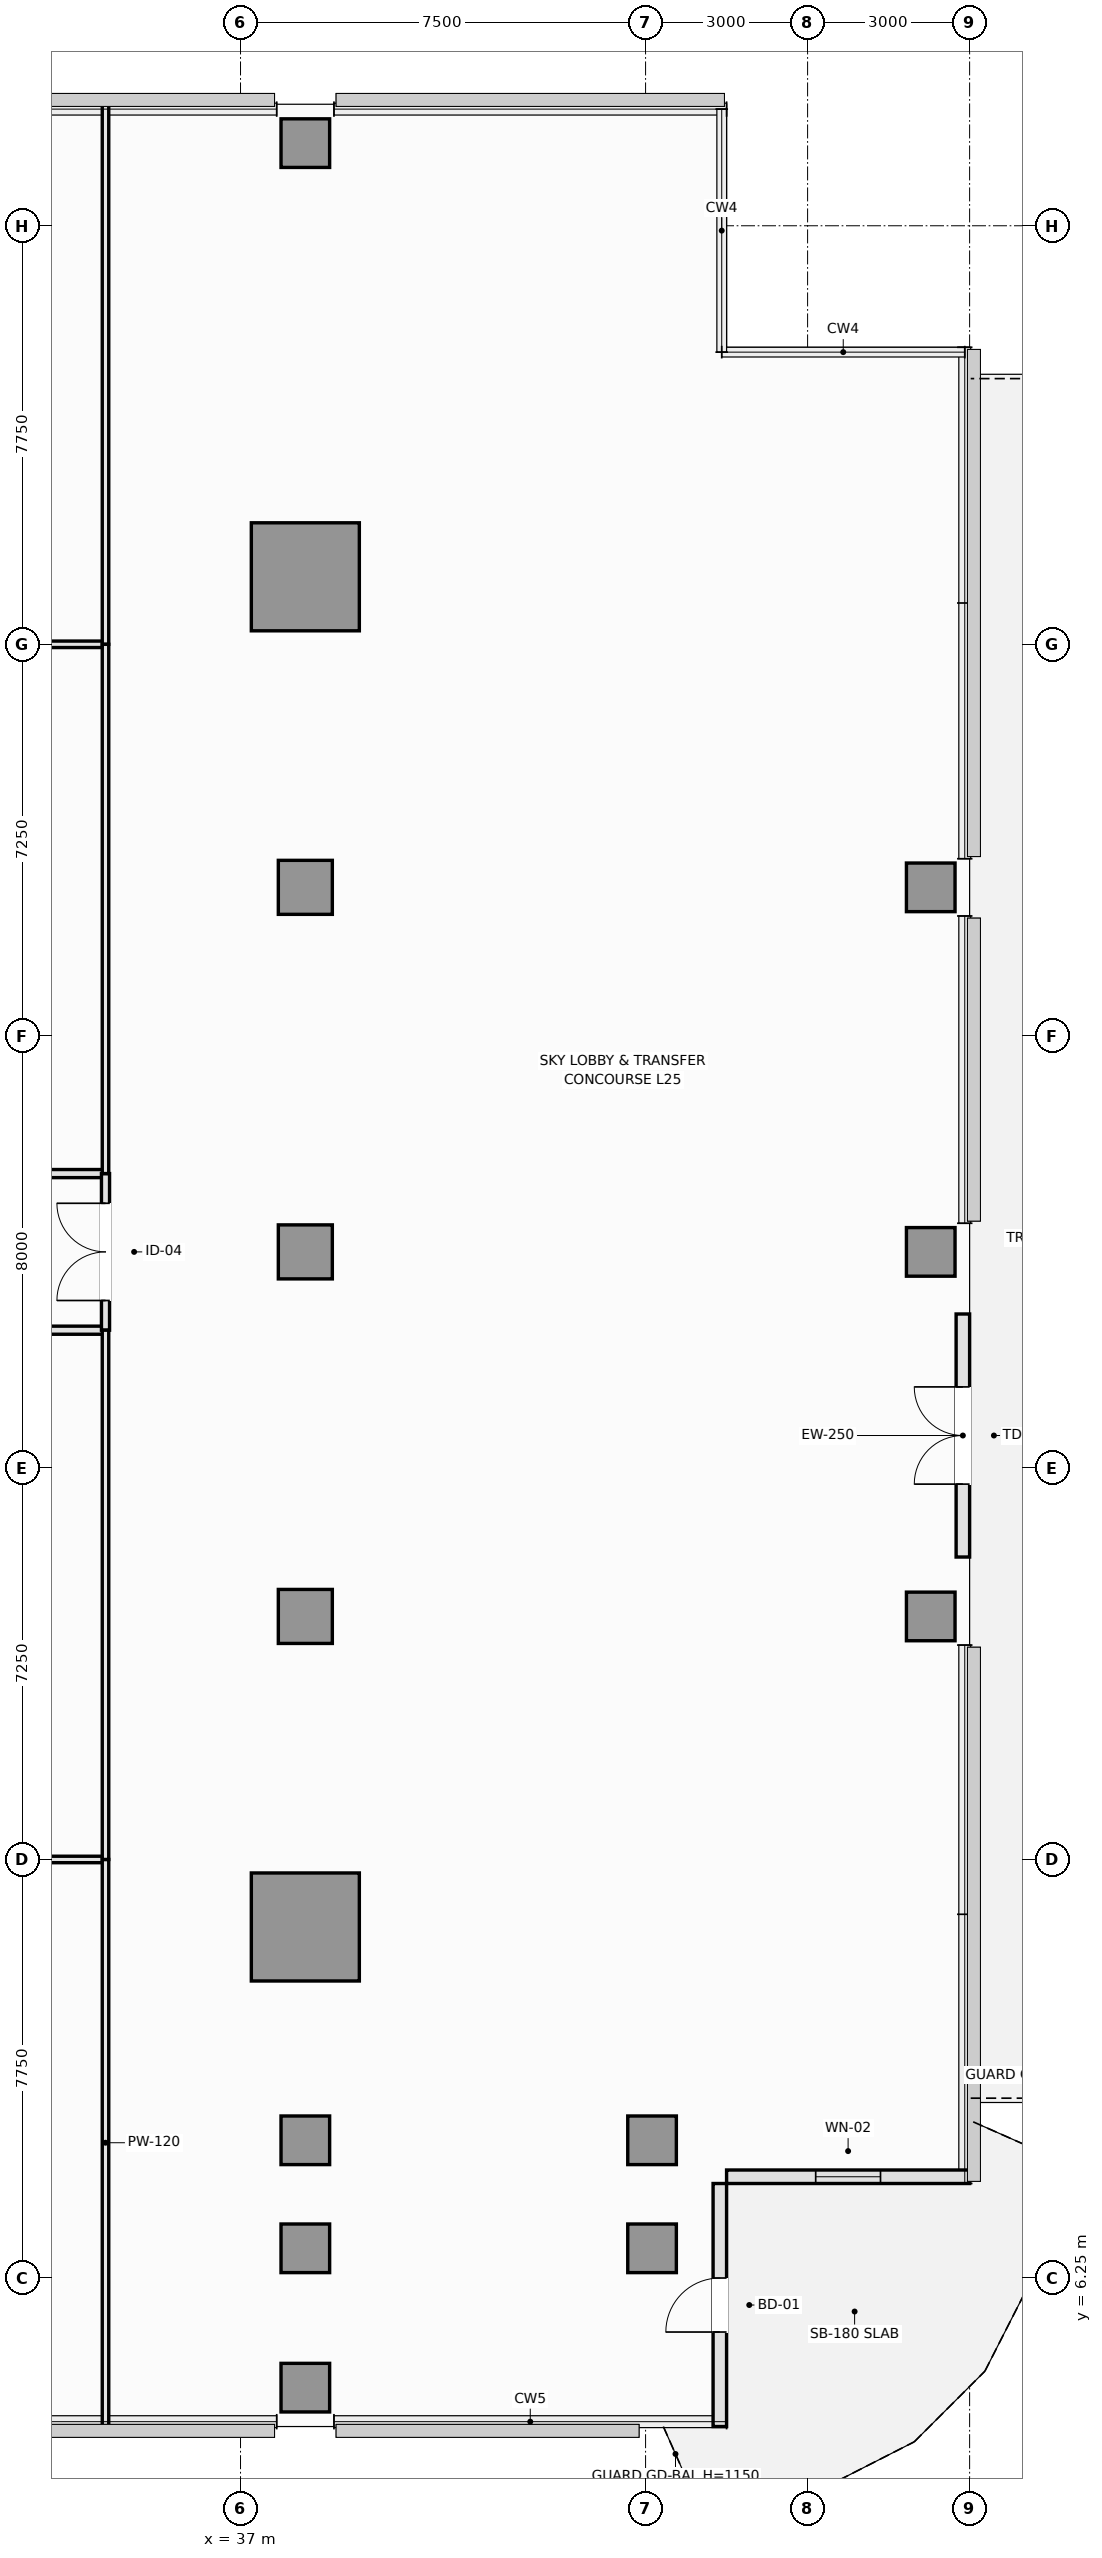
"""IFC4 building model, lengths in metres.
Left out: names, types, materials, properties, quantities, classifications, styles, units other than length and angle.
Written with IfcOpenShell. Run it as: python <this file> out.ifc"""

import sys

from ifc_helpers import new_model, si_unit, direction, frame, frame_2d, origin, origin_2d, place, context, subcontext, project, spatial, rectangle, extrude, element, fill, save


model = new_model("IFC4")
c1 = context("Model", 3, precision=1e-05, world=origin(), true_north=direction((0.0, 1.0)))
c2 = subcontext(c1, "Body", "Model", "MODEL_VIEW")
j1 = project(units=[si_unit("LENGTHUNIT", "METRE"), si_unit("PLANEANGLEUNIT", "RADIAN")], contexts=[c1])
p1 = place(None, origin())
s1 = spatial("IfcSite", under=j1, at=p1, CompositionType="ELEMENT")
p2 = place(p1, origin())
s2 = spatial("IfcBuilding", under=s1, at=p2, CompositionType="ELEMENT")
p3 = place(p2, frame((0.0, 0.0, 97.85)))
s3 = spatial("IfcBuildingStorey", under=s2, at=p3, CompositionType="ELEMENT", Elevation=97.85)
for number, where, z_axis, x_axis in (
    (1, (38.2, 12.75, 0.0), (0.0, 0.0, 1.0), (1.0, 0.0, 0.0)),
    (2, (38.2, 37.75, 0.0), (0.0, 0.0, 1.0), (1.0, 0.0, 0.0)),
):
    element("IfcColumn", number, at=place(p3, frame(where, z_axis=z_axis, x_axis=x_axis)), inside=s3, PredefinedType="COLUMN", context=c2, shape_type="SweptSolid", body=[
        extrude(rectangle(XDim=2.0, YDim=2.0, at=origin_2d()), origin(), (0.0, 0.0, 1.0), 4.4),
    ])
for number, where, z_axis, x_axis in (
    (3, (38.2, 18.5, 0.0), (0.0, 0.0, 1.0), (1.0, 0.0, 0.0)),
    (4, (38.2, 25.25, 0.0), (0.0, 0.0, 1.0), (1.0, 0.0, 0.0)),
    (5, (38.2, 32.0, 0.0), (0.0, 0.0, 1.0), (1.0, 0.0, 0.0)),
):
    element("IfcColumn", number, at=place(p3, frame(where, z_axis=z_axis, x_axis=x_axis)), inside=s3, PredefinedType="COLUMN", context=c2, shape_type="SweptSolid", body=[
        extrude(rectangle(XDim=1.0, YDim=1.0, at=origin_2d()), origin(), (0.0, 0.0, 1.0), 4.4),
    ])
for number, where, z_axis, x_axis in (
    (6, (38.2, 6.8, 0.0), (0.0, 0.0, 1.0), (1.0, 0.0, 0.0)),
    (7, (38.2, 8.8, 0.0), (0.0, 0.0, 1.0), (1.0, 0.0, 0.0)),
    (8, (44.62, 6.8, 0.0), (0.0, 0.0, 1.0), (1.0, 0.0, 0.0)),
    (9, (44.62, 8.8, 0.0), (0.0, 0.0, 1.0), (1.0, 0.0, 0.0)),
    (10, (49.78, 18.5, 0.0), (0.0, 0.0, 1.0), (1.0, 0.0, 0.0)),
    (11, (49.78, 25.25, 0.0), (0.0, 0.0, 1.0), (1.0, 0.0, 0.0)),
    (12, (49.78, 32.0, 0.0), (0.0, 0.0, 1.0), (1.0, 0.0, 0.0)),
    (13, (38.2, 4.22, 0.0), (0.0, 0.0, 1.0), (1.0, 0.0, 0.0)),
    (14, (38.2, 45.78, 0.0), (0.0, 0.0, 1.0), (1.0, 0.0, 0.0)),
):
    element("IfcColumn", number, at=place(p3, frame(where, z_axis=z_axis, x_axis=x_axis)), inside=s3, PredefinedType="COLUMN", context=c2, shape_type="SweptSolid", body=[
        extrude(rectangle(XDim=0.9, YDim=0.9, at=origin_2d()), origin(), (0.0, 0.0, 1.0), 4.4),
    ])
p4 = place(p3, frame((50.375, 19.6, 0.0), z_axis=(0.0, 0.0, 1.0), x_axis=(0.0, 1.0, 0.0)))
e15 = element("IfcWall", 15, at=p4, inside=s3, PredefinedType="SOLIDWALL", context=c2, shape_type="SweptSolid", body=[
    extrude(rectangle(XDim=4.5, YDim=0.25, at=frame_2d((2.25, 0.0))), origin(), (0.0, 0.0, 1.0), 4.22),
])
p5 = place(p4, frame((1.35, 0.0, 0.0)))
e16 = element("IfcOpeningElement", 16, at=p5, cuts=e15, PredefinedType="OPENING", context=c2, shape_type="SweptSolid", body=[
    extrude(rectangle(XDim=1.8, YDim=2.2, at=frame_2d((0.9, 1.1))), frame((0.0, 0.135, 0.0), z_axis=(0.0, -1.0, 0.0), x_axis=(1.0, 0.0, 0.0)), (0.0, 0.0, 1.0), 0.27),
])
p6 = place(p3, frame((45.875, 3.5, 0.0), z_axis=(0.0, 0.0, 1.0), x_axis=(0.0, 1.0, 0.0)))
e17 = element("IfcWall", 17, at=p6, inside=s3, PredefinedType="SOLIDWALL", context=c2, shape_type="SweptSolid", body=[
    extrude(rectangle(XDim=4.5, YDim=0.25, at=frame_2d((2.25, 0.0))), origin(), (0.0, 0.0, 1.0), 3.92),
])
p7 = place(p6, frame((1.75, 0.0, 0.0)))
e18 = element("IfcOpeningElement", 18, at=p7, cuts=e17, PredefinedType="OPENING", context=c2, shape_type="SweptSolid", body=[
    extrude(rectangle(XDim=1.0, YDim=2.2, at=frame_2d((0.5, 1.1))), frame((0.0, 0.135, 0.0), z_axis=(0.0, -1.0, 0.0), x_axis=(1.0, 0.0, 0.0)), (0.0, 0.0, 1.0), 0.27),
])
p8 = place(p3, frame((46.0, 8.125, 0.0), z_axis=(0.0, 0.0, 1.0), x_axis=(1.0, 0.0, 0.0)))
e19 = element("IfcWall", 19, at=p8, inside=s3, PredefinedType="SOLIDWALL", context=c2, shape_type="SweptSolid", body=[
    extrude(rectangle(XDim=4.5, YDim=0.25, at=frame_2d((2.25, 0.0))), origin(), (0.0, 0.0, 1.0), 3.95),
])
p9 = place(p8, frame((1.65, 0.0, 0.9)))
e20 = element("IfcOpeningElement", 20, at=p9, cuts=e19, PredefinedType="OPENING", context=c2, shape_type="SweptSolid", body=[
    extrude(rectangle(XDim=1.2, YDim=1.8, at=frame_2d((0.6, 0.9))), frame((0.0, 0.135, 0.0), z_axis=(0.0, -1.0, 0.0), x_axis=(1.0, 0.0, 0.0)), (0.0, 0.0, 1.0), 0.27),
])
p10 = place(p3, frame((28.55, 23.8, 0.0), z_axis=(0.0, 0.0, 1.0), x_axis=(1.0, 0.0, 0.0)))
e21 = element("IfcWall", 21, at=p10, inside=s3, PredefinedType="PARTITIONING", context=c2, shape_type="SweptSolid", body=[
    extrude(rectangle(XDim=5.95, YDim=0.15, at=frame_2d((2.975, 0.0))), origin(), (0.0, 0.0, 1.0), 4.22),
])
p11 = place(p10, frame((2.475, 0.0, 0.0)))
e22 = element("IfcOpeningElement", 22, at=p11, cuts=e21, PredefinedType="OPENING", context=c2, shape_type="SweptSolid", body=[
    extrude(rectangle(XDim=1.0, YDim=2.15, at=frame_2d((0.5, 1.075))), frame((0.0, 0.085, 0.0), z_axis=(0.0, -1.0, 0.0), x_axis=(1.0, 0.0, 0.0)), (0.0, 0.0, 1.0), 0.17),
])
p12 = place(p3, frame((28.55, 26.7, 0.0), z_axis=(0.0, 0.0, 1.0), x_axis=(1.0, 0.0, 0.0)))
e23 = element("IfcWall", 23, at=p12, inside=s3, PredefinedType="PARTITIONING", context=c2, shape_type="SweptSolid", body=[
    extrude(rectangle(XDim=5.95, YDim=0.15, at=frame_2d((2.975, 0.0))), origin(), (0.0, 0.0, 1.0), 4.22),
])
p13 = place(p12, frame((2.475, 0.0, 0.0)))
e24 = element("IfcOpeningElement", 24, at=p13, cuts=e23, PredefinedType="OPENING", context=c2, shape_type="SweptSolid", body=[
    extrude(rectangle(XDim=1.0, YDim=2.15, at=frame_2d((0.5, 1.075))), frame((0.0, 0.085, 0.0), z_axis=(0.0, -1.0, 0.0), x_axis=(1.0, 0.0, 0.0)), (0.0, 0.0, 1.0), 0.17),
])
p14 = place(p3, frame((34.5, 23.8, 0.0), z_axis=(0.0, 0.0, 1.0), x_axis=(0.0, 1.0, 0.0)))
e25 = element("IfcWall", 25, at=p14, inside=s3, PredefinedType="PARTITIONING", context=c2, shape_type="SweptSolid", body=[
    extrude(rectangle(XDim=2.9, YDim=0.15, at=frame_2d((1.45, 0.0))), origin(), (0.0, 0.0, 1.0), 4.22),
])
p15 = place(p14, frame((0.55, 0.0, 0.0)))
e26 = element("IfcOpeningElement", 26, at=p15, cuts=e25, PredefinedType="OPENING", context=c2, shape_type="SweptSolid", body=[
    extrude(rectangle(XDim=1.8, YDim=2.2, at=frame_2d((0.9, 1.1))), frame((0.0, 0.085, 0.0), z_axis=(0.0, -1.0, 0.0), x_axis=(1.0, 0.0, 0.0)), (0.0, 0.0, 1.0), 0.17),
])
p16 = place(p3, frame((28.55, 14.0, 0.0), z_axis=(0.0, 0.0, 1.0), x_axis=(1.0, 0.0, 0.0)))
e27 = element("IfcWall", 27, at=p16, inside=s3, PredefinedType="PARTITIONING", context=c2, shape_type="SweptSolid", body=[
    extrude(rectangle(XDim=5.95, YDim=0.12, at=frame_2d((2.975, 0.0))), origin(), (0.0, 0.0, 1.0), 4.22),
])
p17 = place(p3, frame((34.5, 3.51, 0.0), z_axis=(0.0, 0.0, 1.0), x_axis=(0.0, 1.0, 0.0)))
e28 = element("IfcWall", 28, at=p17, inside=s3, PredefinedType="PARTITIONING", context=c2, shape_type="SweptSolid", body=[
    extrude(rectangle(XDim=10.49, YDim=0.12, at=frame_2d((5.245, 0.0))), origin(), (0.0, 0.0, 1.0), 3.82),
])
p18 = place(p3, frame((28.55, 36.5, 0.0), z_axis=(0.0, 0.0, 1.0), x_axis=(1.0, 0.0, 0.0)))
e29 = element("IfcWall", 29, at=p18, inside=s3, PredefinedType="PARTITIONING", context=c2, shape_type="SweptSolid", body=[
    extrude(rectangle(XDim=5.95, YDim=0.12, at=frame_2d((2.975, 0.0))), origin(), (0.0, 0.0, 1.0), 4.22),
])
p19 = place(p3, frame((34.5, 36.5, 0.0), z_axis=(0.0, 0.0, 1.0), x_axis=(0.0, 1.0, 0.0)))
e30 = element("IfcWall", 30, at=p19, inside=s3, PredefinedType="PARTITIONING", context=c2, shape_type="SweptSolid", body=[
    extrude(rectangle(XDim=9.99, YDim=0.12, at=frame_2d((4.995, 0.0))), origin(), (0.0, 0.0, 1.0), 3.82),
])
for number, where, z_axis, x_axis in (
    (31, (34.5, 14.0, 0.0), (0.0, 0.0, 1.0), (0.0, 1.0, 0.0)),
    (32, (34.5, 26.7, 0.0), (0.0, 0.0, 1.0), (0.0, 1.0, 0.0)),
):
    element("IfcWall", number, at=place(p3, frame(where, z_axis=z_axis, x_axis=x_axis)), inside=s3, PredefinedType="PARTITIONING", context=c2, shape_type="SweptSolid", body=[
        extrude(rectangle(XDim=9.8, YDim=0.12, at=frame_2d((4.9, 0.0))), origin(), (0.0, 0.0, 1.0), 4.22),
    ])
p20 = place(p5, frame((1.8, 0.0, 0.0), z_axis=(0.0, 0.0, 1.0), x_axis=(-1.0, 0.0, 0.0)))
e33 = element("IfcDoor", 33, at=p20, inside=s3, OperationType="DOUBLE_DOOR_SINGLE_SWING", PredefinedType="DOOR", context=c2, shape_type="SweptSolid", body=[
    extrude(rectangle(XDim=1.8, YDim=2.2, at=frame_2d((0.9, 1.1))), frame((0.0, 0.025, 0.0), z_axis=(0.0, -1.0, 0.0), x_axis=(1.0, 0.0, 0.0)), (0.0, 0.0, 1.0), 0.05),
])
fill(e16, e33)
p21 = place(p7, frame((1.0, 0.0, 0.0), z_axis=(0.0, 0.0, 1.0), x_axis=(-1.0, 0.0, 0.0)))
e34 = element("IfcDoor", 34, at=p21, inside=s3, OperationType="SINGLE_SWING_LEFT", PredefinedType="DOOR", context=c2, shape_type="SweptSolid", body=[
    extrude(rectangle(XDim=1.0, YDim=2.2, at=frame_2d((0.5, 1.1))), frame((0.0, 0.025, 0.0), z_axis=(0.0, -1.0, 0.0), x_axis=(1.0, 0.0, 0.0)), (0.0, 0.0, 1.0), 0.05),
])
fill(e18, e34)
p22 = place(p9, origin())
e35 = element("IfcWindow", 35, at=p22, inside=s3, PartitioningType="SINGLE_PANEL", PredefinedType="WINDOW", context=c2, shape_type="SweptSolid", body=[
    extrude(rectangle(XDim=1.2, YDim=1.8, at=frame_2d((0.6, 0.9))), frame((0.0, 0.03, 0.0), z_axis=(0.0, -1.0, 0.0), x_axis=(1.0, 0.0, 0.0)), (0.0, 0.0, 1.0), 0.06),
])
fill(e20, e35)
p23 = place(p15, origin())
e36 = element("IfcDoor", 36, at=p23, inside=s3, OperationType="DOUBLE_DOOR_SINGLE_SWING", PredefinedType="DOOR", context=c2, shape_type="SweptSolid", body=[
    extrude(rectangle(XDim=1.8, YDim=2.2, at=frame_2d((0.9, 1.1))), frame((0.0, 0.025, 0.0), z_axis=(0.0, -1.0, 0.0), x_axis=(1.0, 0.0, 0.0)), (0.0, 0.0, 1.0), 0.05),
])
fill(e26, e36)
save(model, sys.argv[1])
